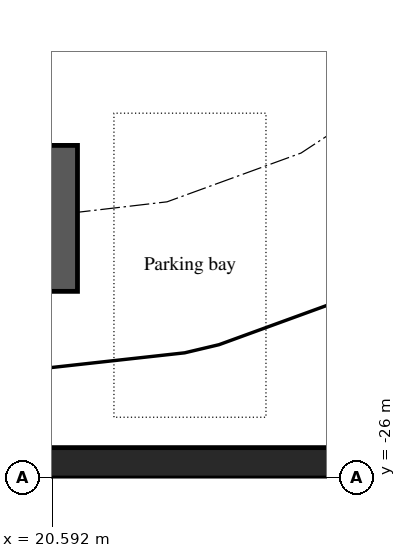
"""IFC4 building model, lengths in metres.
Left out: names, types, materials, properties, quantities, classifications, styles, units other than length and angle.
Written with IfcOpenShell. Run it as: python <this file> out.ifc"""

import sys

from ifc_helpers import new_model, si_unit, direction, frame, frame_2d, origin, origin_2d, place, context, subcontext, project, spatial, rectangle, extrude, element, save


model = new_model("IFC4")
c1 = context("Model", 3, precision=1e-05, world=origin(), true_north=direction((0.0, 1.0)))
c2 = subcontext(c1, "Body", "Model", "MODEL_VIEW")
j1 = project(units=[si_unit("LENGTHUNIT", "METRE"), si_unit("PLANEANGLEUNIT", "RADIAN")], contexts=[c1])
p1 = place(None, origin())
s1 = spatial("IfcSite", under=j1, at=p1, CompositionType="ELEMENT")
p2 = place(p1, origin())
s2 = spatial("IfcBuilding", under=s1, at=p2, CompositionType="ELEMENT")
p3 = place(p2, frame((0.0, 0.0, -8.4)))
s3 = spatial("IfcBuildingStorey", under=s2, at=p3, CompositionType="ELEMENT", Elevation=-8.4)
p4 = place(p3, frame((19.2, -21.73, 0.0), z_axis=(0.0, 0.0, 1.0), x_axis=(1.0, 0.0, 0.0)))
e1 = element("IfcColumn", 1, at=p4, inside=s3, PredefinedType="COLUMN", context=c2, shape_type="SweptSolid", body=[
    extrude(rectangle(XDim=3.6, YDim=2.4, at=origin_2d()), origin(), (0.0, 0.0, 1.0), 3.82),
])
p5 = place(p3, frame((-40.0, -25.75, -0.4), z_axis=(0.0, 0.0, 1.0), x_axis=(1.0, 0.0, 0.0)))
e2 = element("IfcWall", 2, at=p5, inside=s3, PredefinedType="SOLIDWALL", context=c2, shape_type="SweptSolid", body=[
    extrude(rectangle(XDim=80.0, YDim=0.5, at=frame_2d((40.0, 0.0))), origin(), (0.0, 0.0, 1.0), 4.22),
])
save(model, sys.argv[1])
